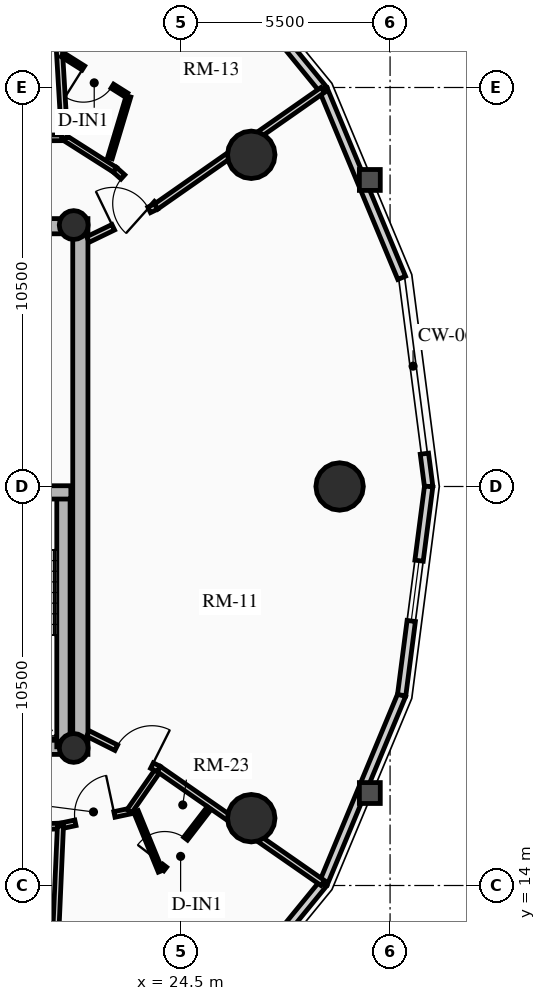
"""IFC4 building model, lengths in metres.
Left out: names, types, materials, properties, quantities, classifications, styles, units other than length and angle.
Written with IfcOpenShell. Run it as: python <this file> out.ifc"""

import sys

from ifc_helpers import new_model, si_unit, direction, frame, frame_2d, origin, origin_2d, place, context, subcontext, project, spatial, rectangle, circle, hollow_circle, extrude, source, transform, mapped, element, fill, save


model = new_model("IFC4")
c1 = context("Model", 3, precision=1e-05, world=origin(), true_north=direction((0.0, 1.0)))
c2 = subcontext(c1, "Body", "Model", "MODEL_VIEW")
j1 = project(units=[si_unit("LENGTHUNIT", "METRE"), si_unit("PLANEANGLEUNIT", "RADIAN")], contexts=[c1])
p1 = place(None, origin())
s1 = spatial("IfcSite", under=j1, at=p1, CompositionType="ELEMENT")
p2 = place(p1, origin())
s2 = spatial("IfcBuilding", under=s1, at=p2, CompositionType="ELEMENT")
p3 = place(p2, frame((0.0, 0.0, 154.51)))
s3 = spatial("IfcBuildingStorey", under=s2, at=p3, CompositionType="ELEMENT", Elevation=154.51)
p4 = place(p3, frame((21.85, 17.45, 0.0), z_axis=(0.0, 0.0, 1.0), x_axis=(0.0, 1.0, 0.0)))
e1 = element("IfcWall", 1, at=p4, inside=s3, PredefinedType="SHEAR", context=c2, shape_type="SweptSolid", body=[
    extrude(rectangle(XDim=14.1, YDim=0.4, at=frame_2d((7.05, 0.0))), origin(), (0.0, 0.0, 1.0), 2.91),
])
p5 = place(p3, frame((11.15, 17.65, 0.0), z_axis=(0.0, 0.0, 1.0), x_axis=(1.0, 0.0, 0.0)))
e2 = element("IfcWall", 2, at=p5, inside=s3, PredefinedType="SHEAR", context=c2, shape_type="SweptSolid", body=[
    extrude(rectangle(XDim=10.7, YDim=0.4, at=frame_2d((5.35, 0.0))), origin(), (0.0, 0.0, 1.0), 2.91),
])
m1 = source(origin(), c2, "Body", "SweptSolid", [
    extrude(rectangle(XDim=1.5, YDim=2.02, at=frame_2d((0.75, 1.01))), frame((0.0, 0.21, 0.0), z_axis=(0.0, -1.0, 0.0), x_axis=(1.0, 0.0, 0.0)), (0.0, 0.0, 1.0), 0.42),
])
p6 = place(p5, frame((5.45, 0.0, 0.0)))
e3 = element("IfcOpeningElement", 3, at=p6, cuts=e2, PredefinedType="OPENING", context=c2, shape_type="MappedRepresentation", body=[
    mapped(m1, transform((0.0, 0.0, 0.0), x_axis=(1.0, 0.0, 0.0), y_axis=(0.0, 1.0, 0.0), z_axis=(0.0, 0.0, 1.0), scale=1.0)),
])
p7 = place(p3, frame((11.15, 31.35, 0.0), z_axis=(0.0, 0.0, 1.0), x_axis=(1.0, 0.0, 0.0)))
e4 = element("IfcWall", 4, at=p7, inside=s3, PredefinedType="SHEAR", context=c2, shape_type="SweptSolid", body=[
    extrude(rectangle(XDim=10.7, YDim=0.4, at=frame_2d((5.35, 0.0))), origin(), (0.0, 0.0, 1.0), 2.91),
])
p8 = place(p7, frame((4.6, 0.0, 0.0)))
e5 = element("IfcOpeningElement", 5, at=p8, cuts=e4, PredefinedType="OPENING", context=c2, shape_type="MappedRepresentation", body=[
    mapped(m1, transform((0.0, 0.0, 0.0), x_axis=(1.0, 0.0, 0.0), y_axis=(0.0, 1.0, 0.0), z_axis=(0.0, 0.0, 1.0), scale=1.0)),
])
p9 = place(p3, frame((21.405, 17.65, 0.0), z_axis=(0.0, 0.0, 1.0), x_axis=(0.0, 1.0, 0.0)))
e6 = element("IfcWall", 6, at=p9, inside=s3, PredefinedType="SHEAR", context=c2, shape_type="SweptSolid", body=[
    extrude(rectangle(XDim=6.695, YDim=0.35, at=frame_2d((3.348, 0.0))), origin(), (0.0, 0.0, 1.0), 2.91),
])
p10 = place(p3, frame((18.315, 24.345, 0.0), z_axis=(0.0, 0.0, 1.0), x_axis=(1.0, 0.0, 0.0)))
e7 = element("IfcWall", 7, at=p10, inside=s3, PredefinedType="SHEAR", context=c2, shape_type="SweptSolid", body=[
    extrude(rectangle(XDim=3.285, YDim=0.35, at=frame_2d((1.643, 0.0))), origin(), (0.0, 0.0, 1.0), 2.91),
])
for number, where, z_axis, x_axis in (
    (8, (21.675, 17.62, 0.0), (0.0, 0.0, 1.0), (1.0, 0.0, 0.0)),
    (9, (21.675, 31.38, 0.0), (0.0, 0.0, 1.0), (1.0, 0.0, 0.0)),
):
    element("IfcColumn", number, at=place(p3, frame(where, z_axis=z_axis, x_axis=x_axis)), inside=s3, PredefinedType="COLUMN", context=c2, shape_type="SweptSolid", body=[
        extrude(hollow_circle(Radius=0.38, WallThickness=0.032, at=origin_2d()), origin(), (0.0, 0.0, 1.0), 2.91),
    ])
for number, where, z_axis, x_axis in (
    (10, (28.672, 24.5, 0.0), (0.0, 0.0, 1.0), (1.0, 0.0, 0.0)),
    (11, (26.347, 33.229, 0.0), (0.0, 0.0, 1.0), (1.0, 0.0, 0.0)),
    (12, (26.347, 15.771, 0.0), (0.0, 0.0, 1.0), (1.0, 0.0, 0.0)),
):
    element("IfcColumn", number, at=place(p3, frame(where, z_axis=z_axis, x_axis=x_axis)), inside=s3, PredefinedType="USERDEFINED", context=c2, shape_type="SweptSolid", body=[
        extrude(circle(Radius=0.625, at=origin_2d()), origin(), (0.0, 0.0, 1.0), 2.91),
    ])
p11 = place(p3, frame((30.903, 25.363, 0.0), z_axis=(0.0, 0.0, 1.0), x_axis=(0.128247365719, -0.991742211054, 0.0)))
e13 = element("IfcWall", 13, at=p11, inside=s3, PredefinedType="SOLIDWALL", context=c2, shape_type="SweptSolid", body=[
    extrude(rectangle(XDim=0.87, YDim=0.22, at=frame_2d((0.435, 0.0))), origin(), (0.0, 0.0, 1.0), 2.675),
])
p12 = place(p3, frame((28.243, 34.945, 0.0), z_axis=(0.0, 0.0, 1.0), x_axis=(0.384259959969, -0.923224936386, 0.0)))
e14 = element("IfcWall", 14, at=p12, inside=s3, PredefinedType="SOLIDWALL", context=c2, shape_type="SweptSolid", body=[
    extrude(rectangle(XDim=5.365, YDim=0.22, at=frame_2d((2.683, 0.0))), origin(), (0.0, 0.0, 1.0), 2.245),
])
p13 = place(p3, frame((25.032, 38.876, 0.0), z_axis=(0.0, 0.0, 1.0), x_axis=(0.632598524901, -0.774479894053, 0.0)))
e15 = element("IfcWall", 15, at=p13, inside=s3, PredefinedType="SOLIDWALL", context=c2, shape_type="SweptSolid", body=[
    extrude(rectangle(XDim=5.076, YDim=0.22, at=frame_2d((2.538, 0.0))), origin(), (0.0, 0.0, 1.0), 2.245),
])
m2 = source(origin(), c2, "Body", "SweptSolid", [
    extrude(rectangle(XDim=1.6, YDim=1.3, at=frame_2d((0.8, 0.65))), frame((0.0, 0.12, 0.0), z_axis=(0.0, -1.0, 0.0), x_axis=(1.0, 0.0, 0.0)), (0.0, 0.0, 1.0), 0.24),
])
p14 = place(p13, frame((1.738, 0.0, 0.65)))
e16 = element("IfcOpeningElement", 16, at=p14, cuts=e15, PredefinedType="OPENING", context=c2, shape_type="MappedRepresentation", body=[
    mapped(m2, transform((0.0, 0.0, 0.0), x_axis=(1.0, 0.0, 0.0), y_axis=(0.0, 1.0, 0.0), z_axis=(0.0, 0.0, 1.0), scale=1.0)),
])
p15 = place(p3, frame((28.243, 14.055, 0.0), z_axis=(0.0, 0.0, 1.0), x_axis=(-0.632598524901, -0.774479894053, 0.0)))
e17 = element("IfcWall", 17, at=p15, inside=s3, PredefinedType="SOLIDWALL", context=c2, shape_type="SweptSolid", body=[
    extrude(rectangle(XDim=5.076, YDim=0.22, at=frame_2d((2.538, 0.0))), origin(), (0.0, 0.0, 1.0), 2.245),
])
p16 = place(p15, frame((1.738, 0.0, 0.65)))
e18 = element("IfcOpeningElement", 18, at=p16, cuts=e17, PredefinedType="OPENING", context=c2, shape_type="MappedRepresentation", body=[
    mapped(m2, transform((0.0, 0.0, 0.0), x_axis=(1.0, 0.0, 0.0), y_axis=(0.0, 1.0, 0.0), z_axis=(0.0, 0.0, 1.0), scale=1.0)),
])
p17 = place(p3, frame((30.305, 19.009, 0.0), z_axis=(0.0, 0.0, 1.0), x_axis=(-0.384259959969, -0.923224936386, 0.0)))
e19 = element("IfcWall", 19, at=p17, inside=s3, PredefinedType="SOLIDWALL", context=c2, shape_type="SweptSolid", body=[
    extrude(rectangle(XDim=5.365, YDim=0.22, at=frame_2d((2.683, 0.0))), origin(), (0.0, 0.0, 1.0), 2.245),
])
p18 = place(p3, frame((31.015, 24.5, 0.0), z_axis=(0.0, 0.0, 1.0), x_axis=(-0.128266533912, -0.991739732126, 0.0)))
e20 = element("IfcWall", 20, at=p18, inside=s3, PredefinedType="SOLIDWALL", context=c2, shape_type="SweptSolid", body=[
    extrude(rectangle(XDim=5.537, YDim=0.22, at=frame_2d((2.769, 0.0))), origin(), (0.0, 0.0, 1.0), 2.245),
])
p19 = place(p18, frame((1.968, 0.0, 0.65)))
e21 = element("IfcOpeningElement", 21, at=p19, cuts=e20, PredefinedType="OPENING", context=c2, shape_type="MappedRepresentation", body=[
    mapped(m2, transform((0.0, 0.0, 0.0), x_axis=(1.0, 0.0, 0.0), y_axis=(0.0, 1.0, 0.0), z_axis=(0.0, 0.0, 1.0), scale=1.0)),
])
p20 = place(p3, frame((23.841, 31.866, 0.0), z_axis=(0.0, 0.0, 1.0), x_axis=(-0.74511843306, 0.666932171, 0.0)))
e22 = element("IfcWall", 22, at=p20, inside=s3, PredefinedType="PARTITIONING", context=c2, shape_type="SweptSolid", body=[
    extrude(rectangle(XDim=1.455, YDim=0.15, at=frame_2d((0.728, 0.0))), origin(), (0.0, 0.0, 1.0), 2.245),
])
m3 = source(origin(), c2, "Body", "SweptSolid", [
    extrude(rectangle(XDim=1.05, YDim=2.015, at=frame_2d((0.525, 1.007))), frame((0.0, 0.085, 0.0), z_axis=(0.0, -1.0, 0.0), x_axis=(1.0, 0.0, 0.0)), (0.0, 0.0, 1.0), 0.17),
])
p21 = place(p20, frame((0.12, 0.0, 0.0)))
e23 = element("IfcOpeningElement", 23, at=p21, cuts=e22, PredefinedType="OPENING", context=c2, shape_type="MappedRepresentation", body=[
    mapped(m3, transform((0.0, 0.0, 0.0), x_axis=(1.0, 0.0, 0.0), y_axis=(0.0, 1.0, 0.0), z_axis=(0.0, 0.0, 1.0), scale=1.0)),
])
p22 = place(p3, frame((22.756, 32.836, 0.0), z_axis=(0.0, 0.0, 1.0), x_axis=(-0.843828401801, 0.536613108593, 0.0)))
e24 = element("IfcWall", 24, at=p22, inside=s3, PredefinedType="PARTITIONING", context=c2, shape_type="SweptSolid", body=[
    extrude(rectangle(XDim=1.565, YDim=0.15, at=frame_2d((0.783, 0.0))), origin(), (0.0, 0.0, 1.0), 2.245),
])
p23 = place(p3, frame((21.435, 33.677, 0.0), z_axis=(0.0, 0.0, 1.0), x_axis=(-0.999986775557, -0.005142831114, 0.0)))
e25 = element("IfcWall", 25, at=p23, inside=s3, PredefinedType="PARTITIONING", context=c2, shape_type="SweptSolid", body=[
    extrude(rectangle(XDim=3.323, YDim=0.15, at=frame_2d((1.662, 0.0))), origin(), (0.0, 0.0, 1.0), 2.245),
])
p24 = place(p23, frame((1.645, 0.0, 0.0)))
e26 = element("IfcOpeningElement", 26, at=p24, cuts=e25, PredefinedType="OPENING", context=c2, shape_type="MappedRepresentation", body=[
    mapped(m3, transform((0.0, 0.0, 0.0), x_axis=(1.0, 0.0, 0.0), y_axis=(0.0, 1.0, 0.0), z_axis=(0.0, 0.0, 1.0), scale=1.0)),
])
p25 = place(p3, frame((14.813, 15.341, 0.0), z_axis=(0.0, 0.0, 1.0), x_axis=(0.999402077819, 0.034575813105, 0.0)))
e27 = element("IfcWall", 27, at=p25, inside=s3, PredefinedType="PARTITIONING", context=c2, shape_type="SweptSolid", body=[
    extrude(rectangle(XDim=6.517, YDim=0.15, at=frame_2d((3.259, 0.0))), origin(), (0.0, 0.0, 1.0), 2.245),
])
p26 = place(p25, frame((2.734, 0.0, 0.0)))
e28 = element("IfcOpeningElement", 28, at=p26, cuts=e27, PredefinedType="OPENING", context=c2, shape_type="MappedRepresentation", body=[
    mapped(m3, transform((0.0, 0.0, 0.0), x_axis=(1.0, 0.0, 0.0), y_axis=(0.0, 1.0, 0.0), z_axis=(0.0, 0.0, 1.0), scale=1.0)),
])
p27 = place(p3, frame((21.326, 15.566, 0.0), z_axis=(0.0, 0.0, 1.0), x_axis=(0.977908238308, 0.209034632176, 0.0)))
e29 = element("IfcWall", 29, at=p27, inside=s3, PredefinedType="PARTITIONING", context=c2, shape_type="SweptSolid", body=[
    extrude(rectangle(XDim=1.855, YDim=0.15, at=frame_2d((0.927, 0.0))), origin(), (0.0, 0.0, 1.0), 2.245),
])
p28 = place(p27, frame((0.402, 0.0, 0.0)))
e30 = element("IfcOpeningElement", 30, at=p28, cuts=e29, PredefinedType="OPENING", context=c2, shape_type="MappedRepresentation", body=[
    mapped(m3, transform((0.0, 0.0, 0.0), x_axis=(1.0, 0.0, 0.0), y_axis=(0.0, 1.0, 0.0), z_axis=(0.0, 0.0, 1.0), scale=1.0)),
])
p29 = place(p3, frame((23.14, 15.954, 0.0), z_axis=(0.0, 0.0, 1.0), x_axis=(0.570699895117, 0.821158711647, 0.0)))
e31 = element("IfcWall", 31, at=p29, inside=s3, PredefinedType="PARTITIONING", context=c2, shape_type="SweptSolid", body=[
    extrude(rectangle(XDim=1.354, YDim=0.15, at=frame_2d((0.677, 0.0))), origin(), (0.0, 0.0, 1.0), 2.245),
])
p30 = place(p3, frame((23.841, 31.866, 0.0), z_axis=(0.0, 0.0, 1.0), x_axis=(0.819514693563, 0.573058170724, 0.0)))
e32 = element("IfcWall", 32, at=p30, inside=s3, PredefinedType="PARTITIONING", context=c2, shape_type="SweptSolid", body=[
    extrude(rectangle(XDim=5.352, YDim=0.16, at=frame_2d((2.676, 0.0))), origin(), (0.0, 0.0, 1.0), 2.245),
])
p31 = place(p3, frame((21.435, 33.677, 0.0), z_axis=(0.0, 0.0, 1.0), x_axis=(-0.059087305226, 0.99825281886, 0.0)))
e33 = element("IfcWall", 33, at=p31, inside=s3, PredefinedType="PARTITIONING", context=c2, shape_type="SweptSolid", body=[
    extrude(rectangle(XDim=7.718, YDim=0.16, at=frame_2d((3.859, 0.0))), origin(), (0.0, 0.0, 1.0), 2.245),
])
p32 = place(p3, frame((21.326, 15.566, 0.0), z_axis=(0.0, 0.0, 1.0), x_axis=(-0.043642330618, -0.999047219594, 0.0)))
e34 = element("IfcWall", 34, at=p32, inside=s3, PredefinedType="PARTITIONING", context=c2, shape_type="SweptSolid", body=[
    extrude(rectangle(XDim=7.955, YDim=0.16, at=frame_2d((3.978, 0.0))), origin(), (0.0, 0.0, 1.0), 2.245),
])
p33 = place(p3, frame((23.913, 17.065, 0.0), z_axis=(0.0, 0.0, 1.0), x_axis=(0.821126775727, -0.570745843773, 0.0)))
e35 = element("IfcWall", 35, at=p33, inside=s3, PredefinedType="PARTITIONING", context=c2, shape_type="SweptSolid", body=[
    extrude(rectangle(XDim=5.254, YDim=0.16, at=frame_2d((2.627, 0.0))), origin(), (0.0, 0.0, 1.0), 2.245),
])
p34 = place(p3, frame((22.05, 31.0, 0.0), z_axis=(0.0, 0.0, 1.0), x_axis=(0.900241516545, 0.435390872537, 0.0)))
e36 = element("IfcWall", 36, at=p34, inside=s3, PredefinedType="PARTITIONING", context=c2, shape_type="SweptSolid", body=[
    extrude(rectangle(XDim=1.989, YDim=0.16, at=frame_2d((0.995, 0.0))), origin(), (0.0, 0.0, 1.0), 2.245),
])
m4 = source(origin(), c2, "Body", "SweptSolid", [
    extrude(rectangle(XDim=1.05, YDim=2.015, at=frame_2d((0.525, 1.007))), frame((0.0, 0.09, 0.0), z_axis=(0.0, -1.0, 0.0), x_axis=(1.0, 0.0, 0.0)), (0.0, 0.0, 1.0), 0.18),
])
p35 = place(p34, frame((0.739, 0.0, 0.0)))
e37 = element("IfcOpeningElement", 37, at=p35, cuts=e36, PredefinedType="OPENING", context=c2, shape_type="MappedRepresentation", body=[
    mapped(m4, transform((0.0, 0.0, 0.0), x_axis=(1.0, 0.0, 0.0), y_axis=(0.0, 1.0, 0.0), z_axis=(0.0, 0.0, 1.0), scale=1.0)),
])
p36 = place(p3, frame((22.05, 18.0, 0.0), z_axis=(0.0, 0.0, 1.0), x_axis=(0.893817206679, -0.448431489799, 0.0)))
e38 = element("IfcWall", 38, at=p36, inside=s3, PredefinedType="PARTITIONING", context=c2, shape_type="SweptSolid", body=[
    extrude(rectangle(XDim=2.084, YDim=0.16, at=frame_2d((1.042, 0.0))), origin(), (0.0, 0.0, 1.0), 2.245),
])
p37 = place(p36, frame((0.834, 0.0, 0.0)))
e39 = element("IfcOpeningElement", 39, at=p37, cuts=e38, PredefinedType="OPENING", context=c2, shape_type="MappedRepresentation", body=[
    mapped(m4, transform((0.0, 0.0, 0.0), x_axis=(1.0, 0.0, 0.0), y_axis=(0.0, 1.0, 0.0), z_axis=(0.0, 0.0, 1.0), scale=1.0)),
])
p38 = place(p3, frame((22.628, 33.142, 0.0), z_axis=(0.0, 0.0, 1.0), x_axis=(0.28808673097, 0.957604320917, 0.0)))
e40 = element("IfcWall", 40, at=p38, inside=s3, PredefinedType="PARTITIONING", context=c2, shape_type="SweptSolid", body=[
    extrude(rectangle(XDim=1.698, YDim=0.125, at=frame_2d((0.849, 0.0))), origin(), (0.0, 0.0, 1.0), 2.245),
])
p39 = place(p3, frame((23.064, 34.801, 0.0), z_axis=(0.0, 0.0, 1.0), x_axis=(-0.846418905871, 0.532517638942, 0.0)))
e41 = element("IfcWall", 41, at=p39, inside=s3, PredefinedType="PARTITIONING", context=c2, shape_type="SweptSolid", body=[
    extrude(rectangle(XDim=1.993, YDim=0.125, at=frame_2d((0.997, 0.0))), origin(), (0.0, 0.0, 1.0), 2.675),
])
m5 = source(origin(), c2, "Body", "SweptSolid", [
    extrude(rectangle(XDim=0.9, YDim=2.005, at=frame_2d((0.45, 1.002))), frame((0.0, 0.073, 0.0), z_axis=(0.0, -1.0, 0.0), x_axis=(1.0, 0.0, 0.0)), (0.0, 0.0, 1.0), 0.145),
])
p40 = place(p39, frame((0.44, 0.0, 0.0)))
e42 = element("IfcOpeningElement", 42, at=p40, cuts=e41, PredefinedType="OPENING", context=c2, shape_type="MappedRepresentation", body=[
    mapped(m5, transform((0.0, 0.0, 0.0), x_axis=(1.0, 0.0, 0.0), y_axis=(0.0, 1.0, 0.0), z_axis=(0.0, 0.0, 1.0), scale=1.0)),
])
p41 = place(p3, frame((23.315, 15.947, 0.0), z_axis=(0.0, 0.0, 1.0), x_axis=(0.37920929394, -0.925310926873, 0.0)))
e43 = element("IfcWall", 43, at=p41, inside=s3, PredefinedType="PARTITIONING", context=c2, shape_type="SweptSolid", body=[
    extrude(rectangle(XDim=1.698, YDim=0.125, at=frame_2d((0.849, 0.0))), origin(), (0.0, 0.0, 1.0), 2.675),
])
p42 = place(p3, frame((23.998, 14.425, 0.0), z_axis=(0.0, 0.0, 1.0), x_axis=(0.610534539262, 0.791989631478, 0.0)))
e44 = element("IfcWall", 44, at=p42, inside=s3, PredefinedType="PARTITIONING", context=c2, shape_type="SweptSolid", body=[
    extrude(rectangle(XDim=2.033, YDim=0.125, at=frame_2d((1.017, 0.0))), origin(), (0.0, 0.0, 1.0), 2.675),
])
p43 = place(p42, frame((0.12, 0.0, 0.0)))
e45 = element("IfcOpeningElement", 45, at=p43, cuts=e44, PredefinedType="OPENING", context=c2, shape_type="MappedRepresentation", body=[
    mapped(m5, transform((0.0, 0.0, 0.0), x_axis=(1.0, 0.0, 0.0), y_axis=(0.0, 1.0, 0.0), z_axis=(0.0, 0.0, 1.0), scale=1.0)),
])
m6 = source(origin(), c2, "Body", "SweptSolid", [
    extrude(rectangle(XDim=1.6, YDim=1.3, at=frame_2d((0.8, 0.65))), frame((0.0, 0.03, 0.0), z_axis=(0.0, -1.0, 0.0), x_axis=(1.0, 0.0, 0.0)), (0.0, 0.0, 1.0), 0.06),
])
p44 = place(p19, origin())
e46 = element("IfcWindow", 46, at=p44, inside=s3, PartitioningType="SINGLE_PANEL", PredefinedType="WINDOW", context=c2, shape_type="MappedRepresentation", body=[
    mapped(m6, transform((0.0, 0.0, 0.0), x_axis=(1.0, 0.0, 0.0), y_axis=(0.0, 1.0, 0.0), z_axis=(0.0, 0.0, 1.0), scale=1.0)),
])
fill(e21, e46)
m7 = source(origin(), c2, "Body", "SweptSolid", [
    extrude(rectangle(XDim=1.05, YDim=2.015, at=frame_2d((0.525, 1.007))), frame((0.0, 0.025, 0.0), z_axis=(0.0, -1.0, 0.0), x_axis=(1.0, 0.0, 0.0)), (0.0, 0.0, 1.0), 0.05),
])
p45 = place(p35, origin())
e47 = element("IfcDoor", 47, at=p45, inside=s3, OperationType="SINGLE_SWING_LEFT", PredefinedType="DOOR", context=c2, shape_type="MappedRepresentation", body=[
    mapped(m7, transform((0.0, 0.0, 0.0), x_axis=(1.0, 0.0, 0.0), y_axis=(0.0, 1.0, 0.0), z_axis=(0.0, 0.0, 1.0), scale=1.0)),
])
fill(e37, e47)
p46 = place(p37, origin())
e48 = element("IfcDoor", 48, at=p46, inside=s3, OperationType="SINGLE_SWING_RIGHT", PredefinedType="DOOR", context=c2, shape_type="MappedRepresentation", body=[
    mapped(m7, transform((0.0, 0.0, 0.0), x_axis=(1.0, 0.0, 0.0), y_axis=(0.0, 1.0, 0.0), z_axis=(0.0, 0.0, 1.0), scale=1.0)),
])
fill(e39, e48)
p47 = place(p21, origin())
e49 = element("IfcDoor", 49, at=p47, inside=s3, OperationType="SINGLE_SWING_LEFT", PredefinedType="DOOR", context=c2, shape_type="MappedRepresentation", body=[
    mapped(m7, transform((0.0, 0.0, 0.0), x_axis=(1.0, 0.0, 0.0), y_axis=(0.0, 1.0, 0.0), z_axis=(0.0, 0.0, 1.0), scale=1.0)),
])
fill(e23, e49)
m8 = source(origin(), c2, "Body", "SweptSolid", [
    extrude(rectangle(XDim=0.9, YDim=2.005, at=frame_2d((0.45, 1.002))), frame((0.0, 0.025, 0.0), z_axis=(0.0, -1.0, 0.0), x_axis=(1.0, 0.0, 0.0)), (0.0, 0.0, 1.0), 0.05),
])
p48 = place(p40, origin())
e50 = element("IfcDoor", 50, at=p48, inside=s3, OperationType="SINGLE_SWING_RIGHT", PredefinedType="DOOR", context=c2, shape_type="MappedRepresentation", body=[
    mapped(m8, transform((0.0, 0.0, 0.0), x_axis=(1.0, 0.0, 0.0), y_axis=(0.0, 1.0, 0.0), z_axis=(0.0, 0.0, 1.0), scale=1.0)),
])
fill(e42, e50)
p49 = place(p28, origin())
e51 = element("IfcDoor", 51, at=p49, inside=s3, OperationType="SINGLE_SWING_RIGHT", PredefinedType="DOOR", context=c2, shape_type="MappedRepresentation", body=[
    mapped(m7, transform((0.0, 0.0, 0.0), x_axis=(1.0, 0.0, 0.0), y_axis=(0.0, 1.0, 0.0), z_axis=(0.0, 0.0, 1.0), scale=1.0)),
])
fill(e30, e51)
p50 = place(p43, origin())
e52 = element("IfcDoor", 52, at=p50, inside=s3, OperationType="SINGLE_SWING_LEFT", PredefinedType="DOOR", context=c2, shape_type="MappedRepresentation", body=[
    mapped(m8, transform((0.0, 0.0, 0.0), x_axis=(1.0, 0.0, 0.0), y_axis=(0.0, 1.0, 0.0), z_axis=(0.0, 0.0, 1.0), scale=1.0)),
])
fill(e45, e52)
save(model, sys.argv[1])
